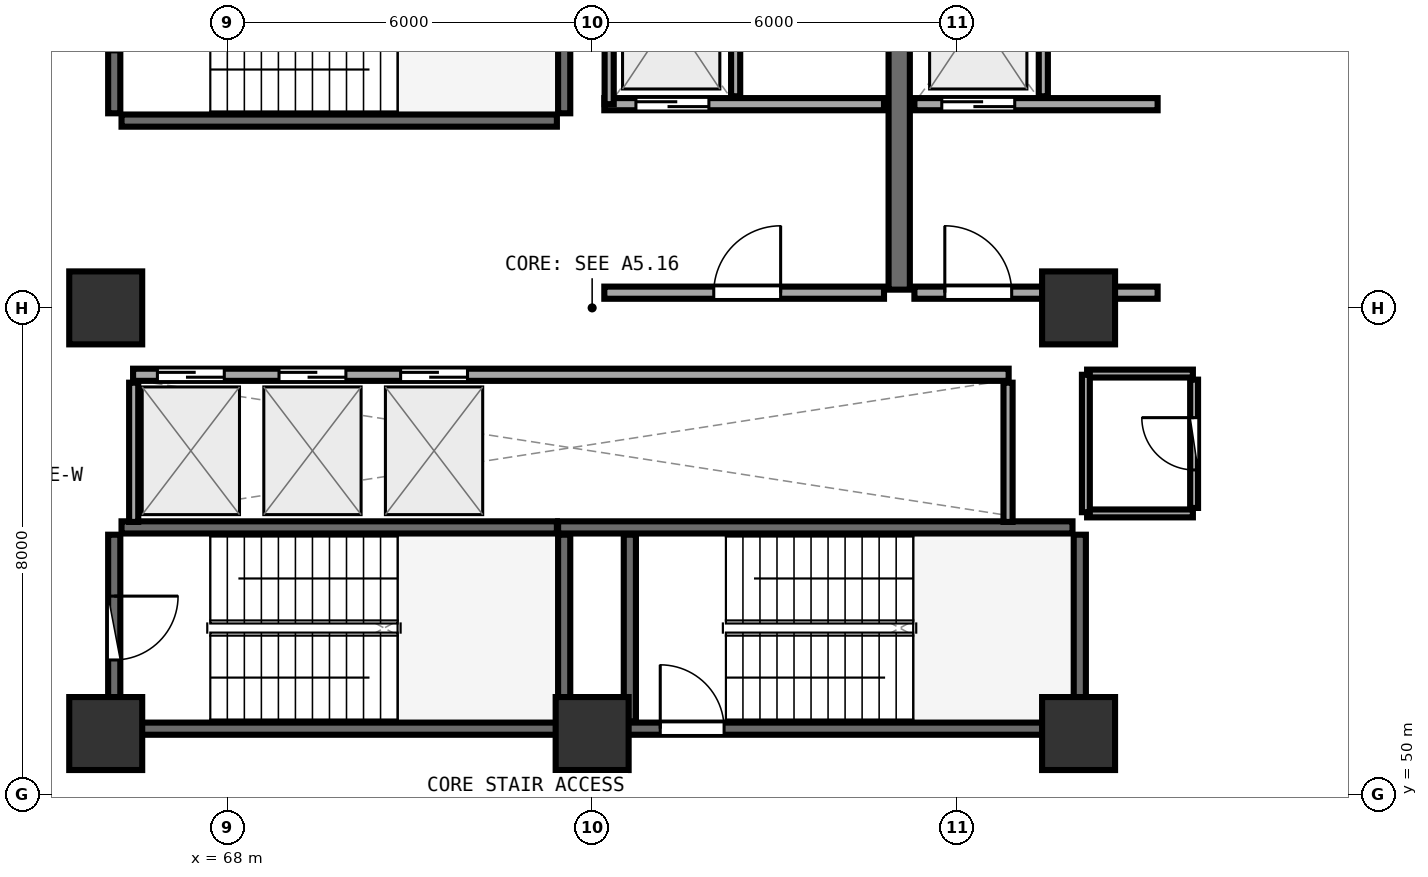
"""IFC4 building model, lengths in metres.
Left out: names, types, materials, properties, quantities, classifications, styles, units other than length and angle.
Written with IfcOpenShell. Run it as: python <this file> out.ifc"""

import sys

from ifc_helpers import new_model, si_unit, direction, frame, frame_2d, origin, origin_2d, place, context, subcontext, project, spatial, rectangle, extrude, element, fill, save


model = new_model("IFC4")
c1 = context("Model", 3, precision=1e-05, world=origin(), true_north=direction((0.0, 1.0)))
c2 = subcontext(c1, "Body", "Model", "MODEL_VIEW")
j1 = project(units=[si_unit("LENGTHUNIT", "METRE"), si_unit("PLANEANGLEUNIT", "RADIAN")], contexts=[c1])
p1 = place(None, origin())
s1 = spatial("IfcSite", under=j1, at=p1, CompositionType="ELEMENT")
p2 = place(p1, origin())
s2 = spatial("IfcBuilding", under=s1, at=p2, CompositionType="ELEMENT")
p3 = place(p2, frame((0.0, 0.0, 189.11)))
s3 = spatial("IfcBuildingStorey", under=s2, at=p3, CompositionType="ELEMENT", Elevation=189.11)
for number, where, z_axis, x_axis in (
    (1, (66.0, 51.0, 0.0), (0.0, 0.0, 1.0), (1.0, 0.0, 0.0)),
    (2, (74.0, 51.0, 0.0), (0.0, 0.0, 1.0), (1.0, 0.0, 0.0)),
    (3, (82.0, 51.0, 0.0), (0.0, 0.0, 1.0), (1.0, 0.0, 0.0)),
    (4, (82.0, 58.0, 0.0), (0.0, 0.0, 1.0), (1.0, 0.0, 0.0)),
    (5, (66.0, 58.0, 0.0), (0.0, 0.0, 1.0), (1.0, 0.0, 0.0)),
):
    element("IfcColumn", number, at=place(p3, frame(where, z_axis=z_axis, x_axis=x_axis)), inside=s3, PredefinedType="PILASTER", context=c2, shape_type="SweptSolid", body=[
        extrude(rectangle(XDim=1.2, YDim=1.2, at=origin_2d()), origin(), (0.0, 0.0, 1.0), 4.09),
    ])
p4 = place(p3, frame((66.26, 61.08, 0.0), z_axis=(0.0, 0.0, 1.0), x_axis=(1.0, 0.0, 0.0)))
e6 = element("IfcWall", 6, at=p4, inside=s3, PredefinedType="SHEAR", context=c2, shape_type="SweptSolid", body=[
    extrude(rectangle(XDim=7.16, YDim=0.2, at=frame_2d((3.58, 0.0))), origin(), (0.0, 0.0, 1.0), 3.83),
])
p5 = place(p3, frame((73.54, 61.2, 0.0), z_axis=(0.0, 0.0, 1.0), x_axis=(0.0, 1.0, 0.0)))
e7 = element("IfcWall", 7, at=p5, inside=s3, PredefinedType="SHEAR", context=c2, shape_type="SweptSolid", body=[
    extrude(rectangle(XDim=3.07, YDim=0.2, at=frame_2d((1.535, 0.0))), origin(), (0.0, 0.0, 1.0), 3.83),
])
p6 = place(p3, frame((66.14, 64.27, 0.0), z_axis=(0.0, 0.0, 1.0), x_axis=(0.0, -1.0, 0.0)))
e8 = element("IfcWall", 8, at=p6, inside=s3, PredefinedType="SHEAR", context=c2, shape_type="SweptSolid", body=[
    extrude(rectangle(XDim=3.07, YDim=0.2, at=frame_2d((1.535, 0.0))), origin(), (0.0, 0.0, 1.0), 3.83),
])
p7 = place(p6, frame((1.01, 0.0, 0.0)))
e9 = element("IfcOpeningElement", 9, at=p7, cuts=e8, PredefinedType="OPENING", context=c2, shape_type="SweptSolid", body=[
    extrude(rectangle(XDim=1.05, YDim=2.1, at=frame_2d((0.525, 1.05))), frame((0.0, 0.11, 0.0), z_axis=(0.0, -1.0, 0.0), x_axis=(1.0, 0.0, 0.0)), (0.0, 0.0, 1.0), 0.22),
])
p8 = place(p3, frame((74.0, 51.08, 0.0), z_axis=(0.0, 0.0, 1.0), x_axis=(1.0, 0.0, 0.0)))
e10 = element("IfcWall", 10, at=p8, inside=s3, PredefinedType="SHEAR", context=c2, shape_type="SweptSolid", body=[
    extrude(rectangle(XDim=7.9, YDim=0.2, at=frame_2d((3.95, 0.0))), origin(), (0.0, 0.0, 1.0), 3.83),
])
p9 = place(p8, frame((1.12, 0.0, 0.0)))
e11 = element("IfcOpeningElement", 11, at=p9, cuts=e10, PredefinedType="OPENING", context=c2, shape_type="SweptSolid", body=[
    extrude(rectangle(XDim=1.05, YDim=2.1, at=frame_2d((0.525, 1.05))), frame((0.0, 0.11, 0.0), z_axis=(0.0, -1.0, 0.0), x_axis=(1.0, 0.0, 0.0)), (0.0, 0.0, 1.0), 0.22),
])
p10 = place(p3, frame((82.02, 51.2, 0.0), z_axis=(0.0, 0.0, 1.0), x_axis=(0.0, 1.0, 0.0)))
e12 = element("IfcWall", 12, at=p10, inside=s3, PredefinedType="SHEAR", context=c2, shape_type="SweptSolid", body=[
    extrude(rectangle(XDim=3.07, YDim=0.2, at=frame_2d((1.535, 0.0))), origin(), (0.0, 0.0, 1.0), 3.83),
])
p11 = place(p3, frame((81.9, 54.39, 0.0), z_axis=(0.0, 0.0, 1.0), x_axis=(-1.0, 0.0, 0.0)))
e13 = element("IfcWall", 13, at=p11, inside=s3, PredefinedType="SHEAR", context=c2, shape_type="SweptSolid", body=[
    extrude(rectangle(XDim=8.46, YDim=0.2, at=frame_2d((4.23, 0.0))), origin(), (0.0, 0.0, 1.0), 3.83),
])
p12 = place(p3, frame((74.62, 54.27, 0.0), z_axis=(0.0, 0.0, 1.0), x_axis=(0.0, -1.0, 0.0)))
e14 = element("IfcWall", 14, at=p12, inside=s3, PredefinedType="SHEAR", context=c2, shape_type="SweptSolid", body=[
    extrude(rectangle(XDim=3.07, YDim=0.2, at=frame_2d((1.535, 0.0))), origin(), (0.0, 0.0, 1.0), 3.83),
])
p13 = place(p3, frame((66.26, 51.08, 0.0), z_axis=(0.0, 0.0, 1.0), x_axis=(1.0, 0.0, 0.0)))
e15 = element("IfcWall", 15, at=p13, inside=s3, PredefinedType="SHEAR", context=c2, shape_type="SweptSolid", body=[
    extrude(rectangle(XDim=7.16, YDim=0.2, at=frame_2d((3.58, 0.0))), origin(), (0.0, 0.0, 1.0), 3.83),
])
p14 = place(p3, frame((73.54, 51.2, 0.0), z_axis=(0.0, 0.0, 1.0), x_axis=(0.0, 1.0, 0.0)))
e16 = element("IfcWall", 16, at=p14, inside=s3, PredefinedType="SHEAR", context=c2, shape_type="SweptSolid", body=[
    extrude(rectangle(XDim=3.07, YDim=0.2, at=frame_2d((1.535, 0.0))), origin(), (0.0, 0.0, 1.0), 3.83),
])
p15 = place(p3, frame((73.42, 54.39, 0.0), z_axis=(0.0, 0.0, 1.0), x_axis=(-1.0, 0.0, 0.0)))
e17 = element("IfcWall", 17, at=p15, inside=s3, PredefinedType="SHEAR", context=c2, shape_type="SweptSolid", body=[
    extrude(rectangle(XDim=7.16, YDim=0.2, at=frame_2d((3.58, 0.0))), origin(), (0.0, 0.0, 1.0), 3.83),
])
p16 = place(p3, frame((66.14, 54.27, 0.0), z_axis=(0.0, 0.0, 1.0), x_axis=(0.0, -1.0, 0.0)))
e18 = element("IfcWall", 18, at=p16, inside=s3, PredefinedType="SHEAR", context=c2, shape_type="SweptSolid", body=[
    extrude(rectangle(XDim=3.07, YDim=0.2, at=frame_2d((1.535, 0.0))), origin(), (0.0, 0.0, 1.0), 3.83),
])
p17 = place(p16, frame((1.01, 0.0, 0.0)))
e19 = element("IfcOpeningElement", 19, at=p17, cuts=e18, PredefinedType="OPENING", context=c2, shape_type="SweptSolid", body=[
    extrude(rectangle(XDim=1.05, YDim=2.1, at=frame_2d((0.525, 1.05))), frame((0.0, 0.11, 0.0), z_axis=(0.0, -1.0, 0.0), x_axis=(1.0, 0.0, 0.0)), (0.0, 0.0, 1.0), 0.22),
])
p18 = place(p3, frame((79.05, 58.3, 0.0), z_axis=(0.0, 0.0, 1.0), x_axis=(0.0, 1.0, 0.0)))
e20 = element("IfcWall", 20, at=p18, inside=s3, PredefinedType="SHEAR", context=c2, shape_type="SweptSolid", body=[
    extrude(rectangle(XDim=6.3, YDim=0.35, at=frame_2d((3.15, 0.0))), origin(), (0.0, 0.0, 1.0), 3.83),
])
p19 = place(p3, frame((74.2, 61.35, 0.0), z_axis=(0.0, 0.0, 1.0), x_axis=(1.0, 0.0, 0.0)))
e21 = element("IfcWall", 21, at=p19, inside=s3, PredefinedType="SOLIDWALL", context=c2, shape_type="SweptSolid", body=[
    extrude(rectangle(XDim=4.6, YDim=0.2, at=frame_2d((2.3, 0.0))), origin(), (0.0, 0.0, 1.0), 3.82),
])
p20 = place(p19, frame((0.52, 0.0, 0.0)))
e22 = element("IfcOpeningElement", 22, at=p20, cuts=e21, PredefinedType="OPENING", context=c2, shape_type="SweptSolid", body=[
    extrude(rectangle(XDim=1.2, YDim=2.15, at=frame_2d((0.6, 1.075))), frame((0.0, 0.11, 0.0), z_axis=(0.0, -1.0, 0.0), x_axis=(1.0, 0.0, 0.0)), (0.0, 0.0, 1.0), 0.22),
])
p21 = place(p3, frame((74.28, 61.35, 0.0), z_axis=(0.0, 0.0, 1.0), x_axis=(0.0, 1.0, 0.0)))
e23 = element("IfcWall", 23, at=p21, inside=s3, PredefinedType="PARTITIONING", context=c2, shape_type="SweptSolid", body=[
    extrude(rectangle(XDim=2.97, YDim=0.15, at=frame_2d((1.485, 0.0))), origin(), (0.0, 0.0, 1.0), 3.82),
])
p22 = place(p3, frame((76.36, 61.48, 0.0), z_axis=(0.0, 0.0, 1.0), x_axis=(0.0, 1.0, 0.0)))
e24 = element("IfcWall", 24, at=p22, inside=s3, PredefinedType="PARTITIONING", context=c2, shape_type="SweptSolid", body=[
    extrude(rectangle(XDim=2.84, YDim=0.15, at=frame_2d((1.42, 0.0))), origin(), (0.0, 0.0, 1.0), 3.82),
])
p23 = place(p3, frame((79.3, 61.35, 0.0), z_axis=(0.0, 0.0, 1.0), x_axis=(1.0, 0.0, 0.0)))
e25 = element("IfcWall", 25, at=p23, inside=s3, PredefinedType="SOLIDWALL", context=c2, shape_type="SweptSolid", body=[
    extrude(rectangle(XDim=4.0, YDim=0.2, at=frame_2d((2.0, 0.0))), origin(), (0.0, 0.0, 1.0), 3.115),
])
p24 = place(p23, frame((0.45, 0.0, 0.0)))
e26 = element("IfcOpeningElement", 26, at=p24, cuts=e25, PredefinedType="OPENING", context=c2, shape_type="SweptSolid", body=[
    extrude(rectangle(XDim=1.2, YDim=2.15, at=frame_2d((0.6, 1.075))), frame((0.0, 0.11, 0.0), z_axis=(0.0, -1.0, 0.0), x_axis=(1.0, 0.0, 0.0)), (0.0, 0.0, 1.0), 0.22),
])
p25 = place(p3, frame((81.42, 61.48, 0.0), z_axis=(0.0, 0.0, 1.0), x_axis=(0.0, 1.0, 0.0)))
e27 = element("IfcWall", 27, at=p25, inside=s3, PredefinedType="PARTITIONING", context=c2, shape_type="SweptSolid", body=[
    extrude(rectangle(XDim=2.84, YDim=0.15, at=frame_2d((1.42, 0.0))), origin(), (0.0, 0.0, 1.0), 3.82),
])
p26 = place(p3, frame((74.2, 58.25, 0.0), z_axis=(0.0, 0.0, 1.0), x_axis=(1.0, 0.0, 0.0)))
e28 = element("IfcWall", 28, at=p26, inside=s3, PredefinedType="SOLIDWALL", context=c2, shape_type="SweptSolid", body=[
    extrude(rectangle(XDim=4.6, YDim=0.2, at=frame_2d((2.3, 0.0))), origin(), (0.0, 0.0, 1.0), 3.82),
])
p27 = place(p26, frame((1.8, 0.0, 0.0)))
e29 = element("IfcOpeningElement", 29, at=p27, cuts=e28, PredefinedType="OPENING", context=c2, shape_type="SweptSolid", body=[
    extrude(rectangle(XDim=1.1, YDim=2.1, at=frame_2d((0.55, 1.05))), frame((0.0, 0.11, 0.0), z_axis=(0.0, -1.0, 0.0), x_axis=(1.0, 0.0, 0.0)), (0.0, 0.0, 1.0), 0.22),
])
p28 = place(p3, frame((79.3, 58.25, 0.0), z_axis=(0.0, 0.0, 1.0), x_axis=(1.0, 0.0, 0.0)))
e30 = element("IfcWall", 30, at=p28, inside=s3, PredefinedType="SOLIDWALL", context=c2, shape_type="SweptSolid", body=[
    extrude(rectangle(XDim=4.0, YDim=0.2, at=frame_2d((2.0, 0.0))), origin(), (0.0, 0.0, 1.0), 3.115),
])
p29 = place(p28, frame((0.5, 0.0, 0.0)))
e31 = element("IfcOpeningElement", 31, at=p29, cuts=e30, PredefinedType="OPENING", context=c2, shape_type="SweptSolid", body=[
    extrude(rectangle(XDim=1.1, YDim=2.1, at=frame_2d((0.55, 1.05))), frame((0.0, 0.11, 0.0), z_axis=(0.0, -1.0, 0.0), x_axis=(1.0, 0.0, 0.0)), (0.0, 0.0, 1.0), 0.22),
])
p30 = place(p3, frame((66.45, 56.9, 0.0), z_axis=(0.0, 0.0, 1.0), x_axis=(1.0, 0.0, 0.0)))
e32 = element("IfcWall", 32, at=p30, inside=s3, PredefinedType="SOLIDWALL", context=c2, shape_type="SweptSolid", body=[
    extrude(rectangle(XDim=14.4, YDim=0.2, at=frame_2d((7.2, 0.0))), origin(), (0.0, 0.0, 1.0), 3.82),
])
p31 = place(p30, frame((0.4, 0.0, 0.0)))
e33 = element("IfcOpeningElement", 33, at=p31, cuts=e32, PredefinedType="OPENING", context=c2, shape_type="SweptSolid", body=[
    extrude(rectangle(XDim=1.1, YDim=2.1, at=frame_2d((0.55, 1.05))), frame((0.0, 0.11, 0.0), z_axis=(0.0, -1.0, 0.0), x_axis=(1.0, 0.0, 0.0)), (0.0, 0.0, 1.0), 0.22),
])
p32 = place(p30, frame((2.4, 0.0, 0.0)))
e34 = element("IfcOpeningElement", 34, at=p32, cuts=e32, PredefinedType="OPENING", context=c2, shape_type="SweptSolid", body=[
    extrude(rectangle(XDim=1.1, YDim=2.1, at=frame_2d((0.55, 1.05))), frame((0.0, 0.11, 0.0), z_axis=(0.0, -1.0, 0.0), x_axis=(1.0, 0.0, 0.0)), (0.0, 0.0, 1.0), 0.22),
])
p33 = place(p30, frame((4.4, 0.0, 0.0)))
e35 = element("IfcOpeningElement", 35, at=p33, cuts=e32, PredefinedType="OPENING", context=c2, shape_type="SweptSolid", body=[
    extrude(rectangle(XDim=1.1, YDim=2.1, at=frame_2d((0.55, 1.05))), frame((0.0, 0.11, 0.0), z_axis=(0.0, -1.0, 0.0), x_axis=(1.0, 0.0, 0.0)), (0.0, 0.0, 1.0), 0.22),
])
for number, where, z_axis, x_axis in (
    (36, (66.46, 54.48, 0.0), (0.0, 0.0, 1.0), (0.0, 1.0, 0.0)),
    (37, (80.84, 54.48, 0.0), (0.0, 0.0, 1.0), (0.0, 1.0, 0.0)),
):
    element("IfcWall", number, at=place(p3, frame(where, z_axis=z_axis, x_axis=x_axis)), inside=s3, PredefinedType="PARTITIONING", context=c2, shape_type="SweptSolid", body=[
        extrude(rectangle(XDim=2.29, YDim=0.15, at=frame_2d((1.145, 0.0))), origin(), (0.0, 0.0, 1.0), 3.82),
    ])
p34 = place(p3, frame((83.9, 54.71, 0.0), z_axis=(0.0, 0.0, 1.0), x_axis=(0.0, 1.0, 0.0)))
e38 = element("IfcWall", 38, at=p34, inside=s3, PredefinedType="PLUMBINGWALL", context=c2, shape_type="SweptSolid", body=[
    extrude(rectangle(XDim=2.11, YDim=0.13, at=frame_2d((1.055, 0.0))), origin(), (0.0, 0.0, 1.0), 3.82),
])
p35 = place(p34, frame((0.625, 0.0, 0.0)))
e39 = element("IfcOpeningElement", 39, at=p35, cuts=e38, PredefinedType="OPENING", context=c2, shape_type="SweptSolid", body=[
    extrude(rectangle(XDim=0.86, YDim=2.05, at=frame_2d((0.43, 1.025))), frame((0.0, 0.075, 0.0), z_axis=(0.0, -1.0, 0.0), x_axis=(1.0, 0.0, 0.0)), (0.0, 0.0, 1.0), 0.15),
])
for number, where, z_axis, x_axis in (
    (40, (82.14, 54.62, 0.0), (0.0, 0.0, 1.0), (1.0, 0.0, 0.0)),
    (41, (83.88, 56.92, 0.0), (0.0, 0.0, 1.0), (-1.0, 0.0, 0.0)),
):
    element("IfcWall", number, at=place(p3, frame(where, z_axis=z_axis, x_axis=x_axis)), inside=s3, PredefinedType="PLUMBINGWALL", context=c2, shape_type="SweptSolid", body=[
        extrude(rectangle(XDim=1.74, YDim=0.13, at=frame_2d((0.87, 0.0))), origin(), (0.0, 0.0, 1.0), 3.115),
    ])
p36 = place(p3, frame((82.12, 56.9, 0.0), z_axis=(0.0, 0.0, 1.0), x_axis=(0.0, -1.0, 0.0)))
e42 = element("IfcWall", 42, at=p36, inside=s3, PredefinedType="PLUMBINGWALL", context=c2, shape_type="SweptSolid", body=[
    extrude(rectangle(XDim=2.26, YDim=0.13, at=frame_2d((1.13, 0.0))), origin(), (0.0, 0.0, 1.0), 3.115),
])
p37 = place(p9, origin())
e43 = element("IfcDoor", 43, at=p37, inside=s3, OperationType="SINGLE_SWING_LEFT", PredefinedType="DOOR", context=c2, shape_type="SweptSolid", body=[
    extrude(rectangle(XDim=1.05, YDim=2.1, at=frame_2d((0.525, 1.05))), frame((0.0, 0.025, 0.0), z_axis=(0.0, -1.0, 0.0), x_axis=(1.0, 0.0, 0.0)), (0.0, 0.0, 1.0), 0.05),
])
fill(e11, e43)
p38 = place(p17, origin())
e44 = element("IfcDoor", 44, at=p38, inside=s3, OperationType="SINGLE_SWING_LEFT", PredefinedType="DOOR", context=c2, shape_type="SweptSolid", body=[
    extrude(rectangle(XDim=1.05, YDim=2.1, at=frame_2d((0.525, 1.05))), frame((0.0, 0.025, 0.0), z_axis=(0.0, -1.0, 0.0), x_axis=(1.0, 0.0, 0.0)), (0.0, 0.0, 1.0), 0.05),
])
fill(e19, e44)
p39 = place(p20, origin())
e45 = element("IfcDoor", 45, at=p39, inside=s3, OperationType="DOUBLE_DOOR_SLIDING", PredefinedType="DOOR", context=c2, shape_type="SweptSolid", body=[
    extrude(rectangle(XDim=1.2, YDim=2.15, at=frame_2d((0.6, 1.075))), frame((0.0, 0.025, 0.0), z_axis=(0.0, -1.0, 0.0), x_axis=(1.0, 0.0, 0.0)), (0.0, 0.0, 1.0), 0.05),
])
fill(e22, e45)
p40 = place(p24, origin())
e46 = element("IfcDoor", 46, at=p40, inside=s3, OperationType="DOUBLE_DOOR_SLIDING", PredefinedType="DOOR", context=c2, shape_type="SweptSolid", body=[
    extrude(rectangle(XDim=1.2, YDim=2.15, at=frame_2d((0.6, 1.075))), frame((0.0, 0.025, 0.0), z_axis=(0.0, -1.0, 0.0), x_axis=(1.0, 0.0, 0.0)), (0.0, 0.0, 1.0), 0.05),
])
fill(e26, e46)
p41 = place(p27, frame((1.1, 0.0, 0.0), z_axis=(0.0, 0.0, 1.0), x_axis=(-1.0, 0.0, 0.0)))
e47 = element("IfcDoor", 47, at=p41, inside=s3, OperationType="SINGLE_SWING_LEFT", PredefinedType="DOOR", context=c2, shape_type="SweptSolid", body=[
    extrude(rectangle(XDim=1.1, YDim=2.1, at=frame_2d((0.55, 1.05))), frame((0.0, 0.025, 0.0), z_axis=(0.0, -1.0, 0.0), x_axis=(1.0, 0.0, 0.0)), (0.0, 0.0, 1.0), 0.05),
])
fill(e29, e47)
p42 = place(p29, frame((1.1, 0.0, 0.0), z_axis=(0.0, 0.0, 1.0), x_axis=(-1.0, 0.0, 0.0)))
e48 = element("IfcDoor", 48, at=p42, inside=s3, OperationType="SINGLE_SWING_RIGHT", PredefinedType="DOOR", context=c2, shape_type="SweptSolid", body=[
    extrude(rectangle(XDim=1.1, YDim=2.1, at=frame_2d((0.55, 1.05))), frame((0.0, 0.025, 0.0), z_axis=(0.0, -1.0, 0.0), x_axis=(1.0, 0.0, 0.0)), (0.0, 0.0, 1.0), 0.05),
])
fill(e31, e48)
p43 = place(p31, origin())
e49 = element("IfcDoor", 49, at=p43, inside=s3, OperationType="DOUBLE_DOOR_SLIDING", PredefinedType="DOOR", context=c2, shape_type="SweptSolid", body=[
    extrude(rectangle(XDim=1.1, YDim=2.1, at=frame_2d((0.55, 1.05))), frame((0.0, 0.025, 0.0), z_axis=(0.0, -1.0, 0.0), x_axis=(1.0, 0.0, 0.0)), (0.0, 0.0, 1.0), 0.05),
])
fill(e33, e49)
p44 = place(p32, origin())
e50 = element("IfcDoor", 50, at=p44, inside=s3, OperationType="DOUBLE_DOOR_SLIDING", PredefinedType="DOOR", context=c2, shape_type="SweptSolid", body=[
    extrude(rectangle(XDim=1.1, YDim=2.1, at=frame_2d((0.55, 1.05))), frame((0.0, 0.025, 0.0), z_axis=(0.0, -1.0, 0.0), x_axis=(1.0, 0.0, 0.0)), (0.0, 0.0, 1.0), 0.05),
])
fill(e34, e50)
p45 = place(p33, origin())
e51 = element("IfcDoor", 51, at=p45, inside=s3, OperationType="DOUBLE_DOOR_SLIDING", PredefinedType="DOOR", context=c2, shape_type="SweptSolid", body=[
    extrude(rectangle(XDim=1.1, YDim=2.1, at=frame_2d((0.55, 1.05))), frame((0.0, 0.025, 0.0), z_axis=(0.0, -1.0, 0.0), x_axis=(1.0, 0.0, 0.0)), (0.0, 0.0, 1.0), 0.05),
])
fill(e35, e51)
p46 = place(p35, origin())
e52 = element("IfcDoor", 52, at=p46, inside=s3, OperationType="SINGLE_SWING_RIGHT", PredefinedType="DOOR", context=c2, shape_type="SweptSolid", body=[
    extrude(rectangle(XDim=0.86, YDim=2.05, at=frame_2d((0.43, 1.025))), frame((0.0, 0.025, 0.0), z_axis=(0.0, -1.0, 0.0), x_axis=(1.0, 0.0, 0.0)), (0.0, 0.0, 1.0), 0.05),
])
fill(e39, e52)
save(model, sys.argv[1])
